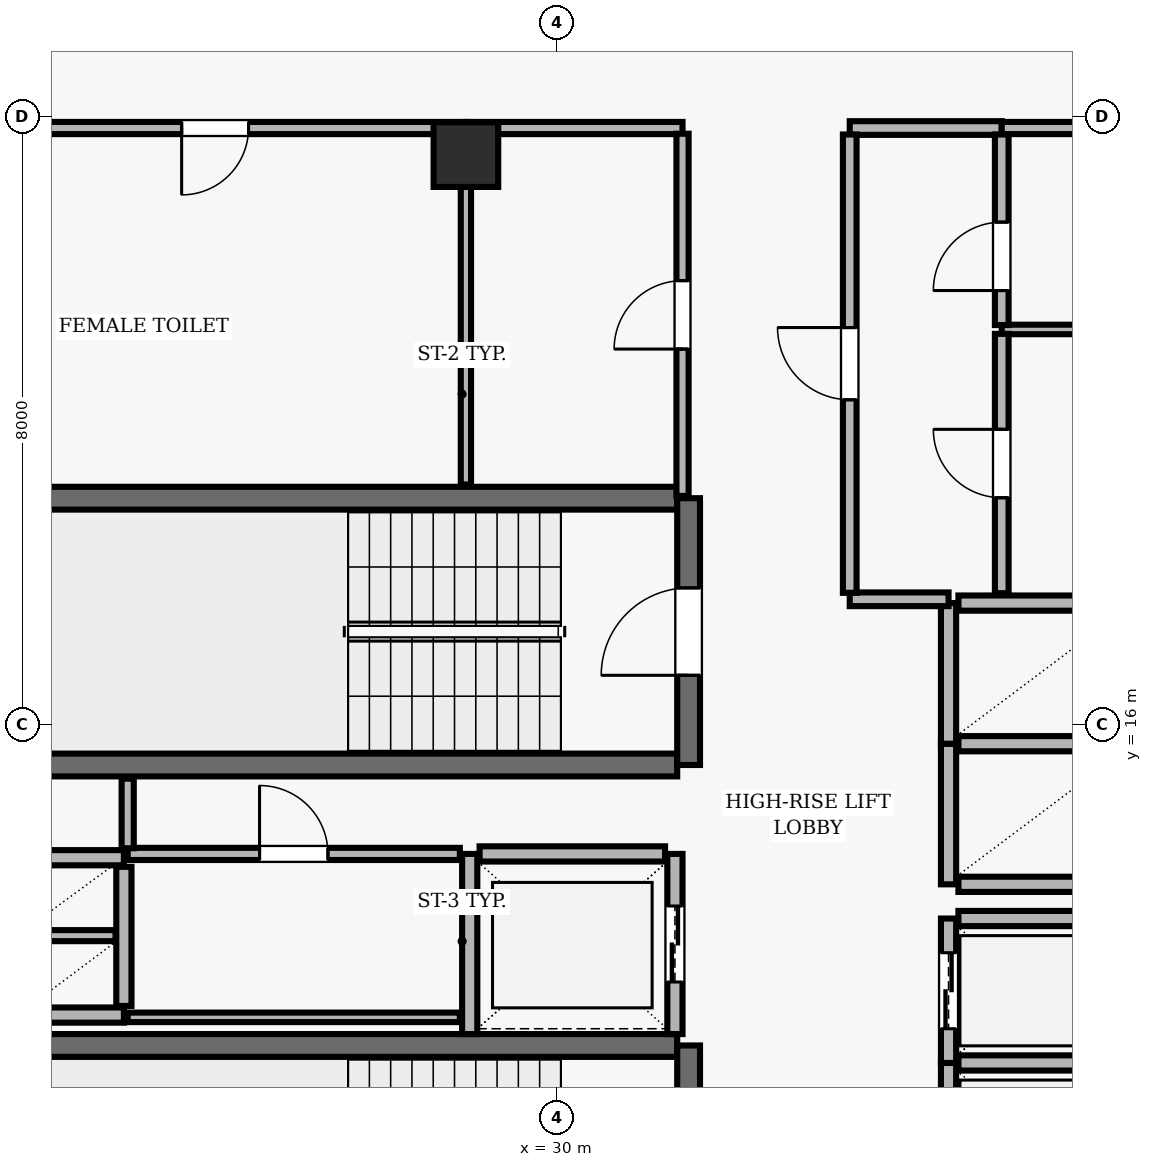
"""IFC4 building model, lengths in metres.
Left out: names, types, materials, properties, quantities, classifications, styles, units other than length and angle.
Written with IfcOpenShell. Run it as: python <this file> out.ifc"""

import sys

from ifc_helpers import new_model, si_unit, direction, frame, frame_2d, origin, origin_2d, place, context, subcontext, project, spatial, rectangle, extrude, element, fill, save


model = new_model("IFC4")
c1 = context("Model", 3, precision=1e-05, world=origin(), true_north=direction((0.0, 1.0)))
c2 = subcontext(c1, "Body", "Model", "MODEL_VIEW")
j1 = project(units=[si_unit("LENGTHUNIT", "METRE"), si_unit("PLANEANGLEUNIT", "RADIAN")], contexts=[c1])
p1 = place(None, origin())
s1 = spatial("IfcSite", under=j1, at=p1, CompositionType="ELEMENT")
p2 = place(p1, origin())
s2 = spatial("IfcBuilding", under=s1, at=p2, CompositionType="ELEMENT")
p3 = place(p2, frame((0.0, 0.0, 271.6)))
s3 = spatial("IfcBuildingStorey", under=s2, at=p3, CompositionType="ELEMENT", Elevation=271.6)
p4 = place(p3, frame((28.8, 23.5, 0.0), z_axis=(0.0, 0.0, 1.0), x_axis=(1.0, 0.0, 0.0)))
e1 = element("IfcColumn", 1, at=p4, inside=s3, PredefinedType="COLUMN", context=c2, shape_type="SweptSolid", body=[
    extrude(rectangle(XDim=0.85, YDim=0.85, at=origin_2d()), origin(), (0.0, 0.0, 1.0), 3.9),
])
for number, where, z_axis, x_axis in (
    (2, (31.58, 18.98, 0.0), (0.0, 0.0, 1.0), (-1.0, 0.0, 0.0)),
    (3, (23.22, 15.47, 0.0), (0.0, 0.0, 1.0), (1.0, 0.0, 0.0)),
):
    element("IfcWall", number, at=place(p3, frame(where, z_axis=z_axis, x_axis=x_axis)), inside=s3, PredefinedType="SHEAR", context=c2, shape_type="SweptSolid", body=[
        extrude(rectangle(XDim=8.36, YDim=0.3, at=frame_2d((4.18, 0.0))), origin(), (0.0, 0.0, 1.0), 3.69),
    ])
p5 = place(p3, frame((31.73, 15.47, 0.0), z_axis=(0.0, 0.0, 1.0), x_axis=(0.0, 1.0, 0.0)))
e4 = element("IfcWall", 4, at=p5, inside=s3, PredefinedType="SHEAR", context=c2, shape_type="SweptSolid", body=[
    extrude(rectangle(XDim=3.51, YDim=0.3, at=frame_2d((1.755, 0.0))), origin(), (0.0, 0.0, 1.0), 3.69),
])
p6 = place(p5, frame((1.18, 0.0, 0.0)))
e5 = element("IfcOpeningElement", 5, at=p6, cuts=e4, PredefinedType="OPENING", context=c2, shape_type="SweptSolid", body=[
    extrude(rectangle(XDim=1.15, YDim=2.15, at=frame_2d((0.575, 1.075))), frame((0.0, 0.16, 0.0), z_axis=(0.0, -1.0, 0.0), x_axis=(1.0, 0.0, 0.0)), (0.0, 0.0, 1.0), 0.32),
])
p7 = place(p3, frame((31.58, 11.78, 0.0), z_axis=(0.0, 0.0, 1.0), x_axis=(-1.0, 0.0, 0.0)))
e6 = element("IfcWall", 6, at=p7, inside=s3, PredefinedType="SHEAR", context=c2, shape_type="SweptSolid", body=[
    extrude(rectangle(XDim=8.36, YDim=0.3, at=frame_2d((4.18, 0.0))), origin(), (0.0, 0.0, 1.0), 3.69),
])
p8 = place(p3, frame((31.73, 8.27, 0.0), z_axis=(0.0, 0.0, 1.0), x_axis=(0.0, 1.0, 0.0)))
e7 = element("IfcWall", 7, at=p8, inside=s3, PredefinedType="SHEAR", context=c2, shape_type="SweptSolid", body=[
    extrude(rectangle(XDim=3.51, YDim=0.3, at=frame_2d((1.755, 0.0))), origin(), (0.0, 0.0, 1.0), 3.69),
])
p9 = place(p8, frame((1.18, 0.0, 0.0)))
e8 = element("IfcOpeningElement", 8, at=p9, cuts=e7, PredefinedType="OPENING", context=c2, shape_type="SweptSolid", body=[
    extrude(rectangle(XDim=1.15, YDim=2.15, at=frame_2d((0.575, 1.075))), frame((0.0, 0.16, 0.0), z_axis=(0.0, -1.0, 0.0), x_axis=(1.0, 0.0, 0.0)), (0.0, 0.0, 1.0), 0.32),
])
p10 = place(p3, frame((35.15, 11.55, 0.0), z_axis=(0.0, 0.0, 1.0), x_axis=(0.0, -1.0, 0.0)))
e9 = element("IfcWall", 9, at=p10, inside=s3, PredefinedType="SOLIDWALL", context=c2, shape_type="SweptSolid", body=[
    extrude(rectangle(XDim=1.9, YDim=0.2, at=frame_2d((0.95, 0.0))), origin(), (0.0, 0.0, 1.0), 3.69),
])
p11 = place(p10, frame((0.45, 0.0, 0.0)))
e10 = element("IfcOpeningElement", 10, at=p11, cuts=e9, PredefinedType="OPENING", context=c2, shape_type="SweptSolid", body=[
    extrude(rectangle(XDim=1.0, YDim=2.1, at=frame_2d((0.5, 1.05))), frame((0.0, 0.11, 0.0), z_axis=(0.0, -1.0, 0.0), x_axis=(1.0, 0.0, 0.0)), (0.0, 0.0, 1.0), 0.22),
])
p12 = place(p3, frame((37.42, 11.55, 0.0), z_axis=(0.0, 0.0, 1.0), x_axis=(-1.0, 0.0, 0.0)))
e11 = element("IfcWall", 11, at=p12, inside=s3, PredefinedType="SOLIDWALL", context=c2, shape_type="SweptSolid", body=[
    extrude(rectangle(XDim=2.14, YDim=0.2, at=frame_2d((1.07, 0.0))), origin(), (0.0, 0.0, 1.0), 3.69),
])
p13 = place(p3, frame((35.15, 13.45, 0.0), z_axis=(0.0, 0.0, 1.0), x_axis=(0.0, -1.0, 0.0)))
e12 = element("IfcWall", 12, at=p13, inside=s3, PredefinedType="SOLIDWALL", context=c2, shape_type="SweptSolid", body=[
    extrude(rectangle(XDim=1.9, YDim=0.2, at=frame_2d((0.95, 0.0))), origin(), (0.0, 0.0, 1.0), 3.69),
])
p14 = place(p13, frame((0.45, 0.0, 0.0)))
e13 = element("IfcOpeningElement", 13, at=p14, cuts=e12, PredefinedType="OPENING", context=c2, shape_type="SweptSolid", body=[
    extrude(rectangle(XDim=1.0, YDim=2.1, at=frame_2d((0.5, 1.05))), frame((0.0, 0.11, 0.0), z_axis=(0.0, -1.0, 0.0), x_axis=(1.0, 0.0, 0.0)), (0.0, 0.0, 1.0), 0.22),
])
p15 = place(p3, frame((37.42, 13.45, 0.0), z_axis=(0.0, 0.0, 1.0), x_axis=(-1.0, 0.0, 0.0)))
e14 = element("IfcWall", 14, at=p15, inside=s3, PredefinedType="SOLIDWALL", context=c2, shape_type="SweptSolid", body=[
    extrude(rectangle(XDim=2.14, YDim=0.2, at=frame_2d((1.07, 0.0))), origin(), (0.0, 0.0, 1.0), 3.69),
])
p16 = place(p3, frame((28.85, 14.3, 0.0), z_axis=(0.0, 0.0, 1.0), x_axis=(0.0, -1.0, 0.0)))
e15 = element("IfcWall", 15, at=p16, inside=s3, PredefinedType="SOLIDWALL", context=c2, shape_type="SweptSolid", body=[
    extrude(rectangle(XDim=2.37, YDim=0.2, at=frame_2d((1.185, 0.0))), origin(), (0.0, 0.0, 1.0), 3.69),
])
p17 = place(p3, frame((31.55, 11.93, 0.0), z_axis=(0.0, 0.0, 1.0), x_axis=(0.0, 1.0, 0.0)))
e16 = element("IfcWall", 16, at=p17, inside=s3, PredefinedType="SOLIDWALL", context=c2, shape_type="SweptSolid", body=[
    extrude(rectangle(XDim=2.37, YDim=0.2, at=frame_2d((1.185, 0.0))), origin(), (0.0, 0.0, 1.0), 3.69),
])
p18 = place(p17, frame((0.685, 0.0, 0.0)))
e17 = element("IfcOpeningElement", 17, at=p18, cuts=e16, PredefinedType="OPENING", context=c2, shape_type="SweptSolid", body=[
    extrude(rectangle(XDim=1.0, YDim=2.1, at=frame_2d((0.5, 1.05))), frame((0.0, 0.11, 0.0), z_axis=(0.0, -1.0, 0.0), x_axis=(1.0, 0.0, 0.0)), (0.0, 0.0, 1.0), 0.22),
])
p19 = place(p3, frame((31.42, 14.3, 0.0), z_axis=(0.0, 0.0, 1.0), x_axis=(-1.0, 0.0, 0.0)))
e18 = element("IfcWall", 18, at=p19, inside=s3, PredefinedType="SOLIDWALL", context=c2, shape_type="SweptSolid", body=[
    extrude(rectangle(XDim=2.44, YDim=0.2, at=frame_2d((1.22, 0.0))), origin(), (0.0, 0.0, 1.0), 3.69),
])
p20 = place(p3, frame((35.15, 15.75, 0.0), z_axis=(0.0, 0.0, 1.0), x_axis=(0.0, -1.0, 0.0)))
e19 = element("IfcWall", 19, at=p20, inside=s3, PredefinedType="SOLIDWALL", context=c2, shape_type="SweptSolid", body=[
    extrude(rectangle(XDim=1.85, YDim=0.2, at=frame_2d((0.925, 0.0))), origin(), (0.0, 0.0, 1.0), 3.69),
])
for number, where, z_axis, x_axis in (
    (20, (35.28, 13.9, 0.0), (0.0, 0.0, 1.0), (1.0, 0.0, 0.0)),
    (21, (37.42, 15.75, 0.0), (0.0, 0.0, 1.0), (-1.0, 0.0, 0.0)),
):
    element("IfcWall", number, at=place(p3, frame(where, z_axis=z_axis, x_axis=x_axis)), inside=s3, PredefinedType="SOLIDWALL", context=c2, shape_type="SweptSolid", body=[
        extrude(rectangle(XDim=2.14, YDim=0.2, at=frame_2d((1.07, 0.0))), origin(), (0.0, 0.0, 1.0), 3.69),
    ])
p21 = place(p3, frame((35.15, 17.6, 0.0), z_axis=(0.0, 0.0, 1.0), x_axis=(0.0, -1.0, 0.0)))
e22 = element("IfcWall", 22, at=p21, inside=s3, PredefinedType="SOLIDWALL", context=c2, shape_type="SweptSolid", body=[
    extrude(rectangle(XDim=1.85, YDim=0.2, at=frame_2d((0.925, 0.0))), origin(), (0.0, 0.0, 1.0), 3.69),
])
p22 = place(p3, frame((37.42, 17.6, 0.0), z_axis=(0.0, 0.0, 1.0), x_axis=(-1.0, 0.0, 0.0)))
e23 = element("IfcWall", 23, at=p22, inside=s3, PredefinedType="SOLIDWALL", context=c2, shape_type="SweptSolid", body=[
    extrude(rectangle(XDim=2.14, YDim=0.2, at=frame_2d((1.07, 0.0))), origin(), (0.0, 0.0, 1.0), 3.69),
])
for number, where, z_axis, x_axis in (
    (24, (22.9, 14.25, 0.0), (0.0, 0.0, 1.0), (1.0, 0.0, 0.0)),
    (25, (22.9, 12.18, 0.0), (0.0, 0.0, 1.0), (1.0, 0.0, 0.0)),
):
    element("IfcWall", number, at=place(p3, frame(where, z_axis=z_axis, x_axis=x_axis)), inside=s3, PredefinedType="SOLIDWALL", context=c2, shape_type="SweptSolid", body=[
        extrude(rectangle(XDim=1.4, YDim=0.2, at=frame_2d((0.7, 0.0))), origin(), (0.0, 0.0, 1.0), 3.69),
    ])
p23 = place(p3, frame((24.3, 12.3, 0.0), z_axis=(0.0, 0.0, 1.0), x_axis=(0.0, 1.0, 0.0)))
e26 = element("IfcWall", 26, at=p23, inside=s3, PredefinedType="SOLIDWALL", context=c2, shape_type="SweptSolid", body=[
    extrude(rectangle(XDim=1.83, YDim=0.2, at=frame_2d((0.915, 0.0))), origin(), (0.0, 0.0, 1.0), 3.69),
])
p24 = place(p3, frame((23.01, 13.225, 0.0), z_axis=(0.0, 0.0, 1.0), x_axis=(1.0, 0.0, 0.0)))
e27 = element("IfcWall", 27, at=p24, inside=s3, PredefinedType="PARTITIONING", context=c2, shape_type="SweptSolid", body=[
    extrude(rectangle(XDim=1.18, YDim=0.145, at=frame_2d((0.59, 0.0))), origin(), (0.0, 0.0, 1.0), 3.69),
])
p25 = place(p3, frame((24.35, 12.15, 0.0), z_axis=(0.0, 0.0, 1.0), x_axis=(1.0, 0.0, 0.0)))
e28 = element("IfcWall", 28, at=p25, inside=s3, PredefinedType="PARTITIONING", context=c2, shape_type="SweptSolid", body=[
    extrude(rectangle(XDim=4.37, YDim=0.125, at=frame_2d((2.185, 0.0))), origin(), (0.0, 0.0, 1.0), 3.69),
])
p26 = place(p3, frame((24.35, 14.3, 0.0), z_axis=(0.0, 0.0, 1.0), x_axis=(1.0, 0.0, 0.0)))
e29 = element("IfcWall", 29, at=p26, inside=s3, PredefinedType="PARTITIONING", context=c2, shape_type="SweptSolid", body=[
    extrude(rectangle(XDim=4.37, YDim=0.16, at=frame_2d((2.185, 0.0))), origin(), (0.0, 0.0, 1.0), 3.69),
])
p27 = place(p26, frame((1.735, 0.0, 0.0)))
e30 = element("IfcOpeningElement", 30, at=p27, cuts=e29, PredefinedType="OPENING", context=c2, shape_type="SweptSolid", body=[
    extrude(rectangle(XDim=0.9, YDim=2.1, at=frame_2d((0.45, 1.05))), frame((0.0, 0.09, 0.0), z_axis=(0.0, -1.0, 0.0), x_axis=(1.0, 0.0, 0.0)), (0.0, 0.0, 1.0), 0.18),
])
p28 = place(p3, frame((28.8, 23.85, 0.0), z_axis=(0.0, 0.0, 1.0), x_axis=(-1.0, 0.0, 0.0)))
e31 = element("IfcWall", 31, at=p28, inside=s3, PredefinedType="PARTITIONING", context=c2, shape_type="SweptSolid", body=[
    extrude(rectangle(XDim=6.6, YDim=0.16, at=frame_2d((3.3, 0.0))), origin(), (0.0, 0.0, 1.0), 3.221),
])
p29 = place(p28, frame((2.86, 0.0, 0.0)))
e32 = element("IfcOpeningElement", 32, at=p29, cuts=e31, PredefinedType="OPENING", context=c2, shape_type="SweptSolid", body=[
    extrude(rectangle(XDim=0.88, YDim=2.1, at=frame_2d((0.44, 1.05))), frame((0.0, 0.09, 0.0), z_axis=(0.0, -1.0, 0.0), x_axis=(1.0, 0.0, 0.0)), (0.0, 0.0, 1.0), 0.18),
])
p30 = place(p3, frame((31.65, 23.85, 0.0), z_axis=(0.0, 0.0, 1.0), x_axis=(-1.0, 0.0, 0.0)))
e33 = element("IfcWall", 33, at=p30, inside=s3, PredefinedType="PARTITIONING", context=c2, shape_type="SweptSolid", body=[
    extrude(rectangle(XDim=2.85, YDim=0.16, at=frame_2d((1.425, 0.0))), origin(), (0.0, 0.0, 1.0), 3.221),
])
p31 = place(p3, frame((33.85, 17.65, 0.0), z_axis=(0.0, 0.0, 1.0), x_axis=(1.0, 0.0, 0.0)))
e34 = element("IfcWall", 34, at=p31, inside=s3, PredefinedType="PARTITIONING", context=c2, shape_type="SweptSolid", body=[
    extrude(rectangle(XDim=1.3, YDim=0.18, at=frame_2d((0.65, 0.0))), origin(), (0.0, 0.0, 1.0), 3.69),
])
p32 = place(p3, frame((35.85, 21.2, 0.0), z_axis=(0.0, 0.0, 1.0), x_axis=(1.0, 0.0, 0.0)))
e35 = element("IfcWall", 35, at=p32, inside=s3, PredefinedType="PARTITIONING", context=c2, shape_type="SweptSolid", body=[
    extrude(rectangle(XDim=2.0, YDim=0.125, at=frame_2d((1.0, 0.0))), origin(), (0.0, 0.0, 1.0), 3.69),
])
p33 = place(p3, frame((35.85, 23.85, 0.0), z_axis=(0.0, 0.0, 1.0), x_axis=(-1.0, 0.0, 0.0)))
e36 = element("IfcWall", 36, at=p33, inside=s3, PredefinedType="PARTITIONING", context=c2, shape_type="SweptSolid", body=[
    extrude(rectangle(XDim=2.0, YDim=0.18, at=frame_2d((1.0, 0.0))), origin(), (0.0, 0.0, 1.0), 3.221),
])
p34 = place(p3, frame((37.85, 23.85, 0.0), z_axis=(0.0, 0.0, 1.0), x_axis=(-1.0, 0.0, 0.0)))
e37 = element("IfcWall", 37, at=p34, inside=s3, PredefinedType="PARTITIONING", context=c2, shape_type="SweptSolid", body=[
    extrude(rectangle(XDim=2.0, YDim=0.16, at=frame_2d((1.0, 0.0))), origin(), (0.0, 0.0, 1.0), 3.221),
])
p35 = place(p3, frame((24.35, 15.29, 0.0), z_axis=(0.0, 0.0, 1.0), x_axis=(0.0, -1.0, 0.0)))
e38 = element("IfcWall", 38, at=p35, inside=s3, PredefinedType="PARTITIONING", context=c2, shape_type="SweptSolid", body=[
    extrude(rectangle(XDim=0.915, YDim=0.16, at=frame_2d((0.458, 0.0))), origin(), (0.0, 0.0, 1.0), 3.69),
])
p36 = place(p3, frame((28.8, 23.775, 0.0), z_axis=(0.0, 0.0, 1.0), x_axis=(0.0, -1.0, 0.0)))
e39 = element("IfcWall", 39, at=p36, inside=s3, PredefinedType="PARTITIONING", context=c2, shape_type="SweptSolid", body=[
    extrude(rectangle(XDim=4.615, YDim=0.135, at=frame_2d((2.308, 0.0))), origin(), (0.0, 0.0, 1.0), 3.69),
])
p37 = place(p3, frame((31.65, 19.01, 0.0), z_axis=(0.0, 0.0, 1.0), x_axis=(0.0, 1.0, 0.0)))
e40 = element("IfcWall", 40, at=p37, inside=s3, PredefinedType="PARTITIONING", context=c2, shape_type="SweptSolid", body=[
    extrude(rectangle(XDim=4.765, YDim=0.16, at=frame_2d((2.382, 0.0))), origin(), (0.0, 0.0, 1.0), 3.69),
])
p38 = place(p37, frame((1.932, 0.0, 0.0)))
e41 = element("IfcOpeningElement", 41, at=p38, cuts=e40, PredefinedType="OPENING", context=c2, shape_type="SweptSolid", body=[
    extrude(rectangle(XDim=0.9, YDim=2.1, at=frame_2d((0.45, 1.05))), frame((0.0, 0.09, 0.0), z_axis=(0.0, -1.0, 0.0), x_axis=(1.0, 0.0, 0.0)), (0.0, 0.0, 1.0), 0.18),
])
p39 = place(p3, frame((33.85, 17.735, 0.0), z_axis=(0.0, 0.0, 1.0), x_axis=(0.0, 1.0, 0.0)))
e42 = element("IfcWall", 42, at=p39, inside=s3, PredefinedType="PARTITIONING", context=c2, shape_type="SweptSolid", body=[
    extrude(rectangle(XDim=6.03, YDim=0.18, at=frame_2d((3.015, 0.0))), origin(), (0.0, 0.0, 1.0), 3.69),
])
p40 = place(p39, frame((2.54, 0.0, 0.0)))
e43 = element("IfcOpeningElement", 43, at=p40, cuts=e42, PredefinedType="OPENING", context=c2, shape_type="SweptSolid", body=[
    extrude(rectangle(XDim=0.95, YDim=2.1, at=frame_2d((0.475, 1.05))), frame((0.0, 0.1, 0.0), z_axis=(0.0, -1.0, 0.0), x_axis=(1.0, 0.0, 0.0)), (0.0, 0.0, 1.0), 0.2),
])
p41 = place(p3, frame((35.85, 17.73, 0.0), z_axis=(0.0, 0.0, 1.0), x_axis=(0.0, 1.0, 0.0)))
e44 = element("IfcWall", 44, at=p41, inside=s3, PredefinedType="PARTITIONING", context=c2, shape_type="SweptSolid", body=[
    extrude(rectangle(XDim=3.412, YDim=0.18, at=frame_2d((1.706, 0.0))), origin(), (0.0, 0.0, 1.0), 3.69),
])
p42 = place(p41, frame((1.256, 0.0, 0.0)))
e45 = element("IfcOpeningElement", 45, at=p42, cuts=e44, PredefinedType="OPENING", context=c2, shape_type="SweptSolid", body=[
    extrude(rectangle(XDim=0.9, YDim=2.1, at=frame_2d((0.45, 1.05))), frame((0.0, 0.1, 0.0), z_axis=(0.0, -1.0, 0.0), x_axis=(1.0, 0.0, 0.0)), (0.0, 0.0, 1.0), 0.2),
])
p43 = place(p3, frame((35.85, 21.258, 0.0), z_axis=(0.0, 0.0, 1.0), x_axis=(0.0, 1.0, 0.0)))
e46 = element("IfcWall", 46, at=p43, inside=s3, PredefinedType="PARTITIONING", context=c2, shape_type="SweptSolid", body=[
    extrude(rectangle(XDim=2.507, YDim=0.18, at=frame_2d((1.253, 0.0))), origin(), (0.0, 0.0, 1.0), 3.69),
])
p44 = place(p43, frame((0.454, 0.0, 0.0)))
e47 = element("IfcOpeningElement", 47, at=p44, cuts=e46, PredefinedType="OPENING", context=c2, shape_type="SweptSolid", body=[
    extrude(rectangle(XDim=0.9, YDim=2.1, at=frame_2d((0.45, 1.05))), frame((0.0, 0.1, 0.0), z_axis=(0.0, -1.0, 0.0), x_axis=(1.0, 0.0, 0.0)), (0.0, 0.0, 1.0), 0.2),
])
p45 = place(p6, origin())
e48 = element("IfcDoor", 48, at=p45, inside=s3, OperationType="SINGLE_SWING_LEFT", PredefinedType="DOOR", context=c2, shape_type="SweptSolid", body=[
    extrude(rectangle(XDim=1.15, YDim=2.15, at=frame_2d((0.575, 1.075))), frame((0.0, 0.025, 0.0), z_axis=(0.0, -1.0, 0.0), x_axis=(1.0, 0.0, 0.0)), (0.0, 0.0, 1.0), 0.05),
])
fill(e5, e48)
p46 = place(p14, origin())
e49 = element("IfcDoor", 49, at=p46, inside=s3, OperationType="DOUBLE_DOOR_SLIDING", PredefinedType="DOOR", context=c2, shape_type="SweptSolid", body=[
    extrude(rectangle(XDim=1.0, YDim=2.1, at=frame_2d((0.5, 1.05))), frame((0.0, 0.025, 0.0), z_axis=(0.0, -1.0, 0.0), x_axis=(1.0, 0.0, 0.0)), (0.0, 0.0, 1.0), 0.05),
])
fill(e13, e49)
p47 = place(p18, origin())
e50 = element("IfcDoor", 50, at=p47, inside=s3, OperationType="DOUBLE_DOOR_SLIDING", PredefinedType="DOOR", context=c2, shape_type="SweptSolid", body=[
    extrude(rectangle(XDim=1.0, YDim=2.1, at=frame_2d((0.5, 1.05))), frame((0.0, 0.025, 0.0), z_axis=(0.0, -1.0, 0.0), x_axis=(1.0, 0.0, 0.0)), (0.0, 0.0, 1.0), 0.05),
])
fill(e17, e50)
p48 = place(p40, origin())
e51 = element("IfcDoor", 51, at=p48, inside=s3, OperationType="SINGLE_SWING_RIGHT", PredefinedType="DOOR", context=c2, shape_type="SweptSolid", body=[
    extrude(rectangle(XDim=0.95, YDim=2.1, at=frame_2d((0.475, 1.05))), frame((0.0, 0.025, 0.0), z_axis=(0.0, -1.0, 0.0), x_axis=(1.0, 0.0, 0.0)), (0.0, 0.0, 1.0), 0.05),
])
fill(e43, e51)
p49 = place(p44, origin())
e52 = element("IfcDoor", 52, at=p49, inside=s3, OperationType="SINGLE_SWING_LEFT", PredefinedType="DOOR", context=c2, shape_type="SweptSolid", body=[
    extrude(rectangle(XDim=0.9, YDim=2.1, at=frame_2d((0.45, 1.05))), frame((0.0, 0.025, 0.0), z_axis=(0.0, -1.0, 0.0), x_axis=(1.0, 0.0, 0.0)), (0.0, 0.0, 1.0), 0.05),
])
fill(e47, e52)
p50 = place(p42, origin())
e53 = element("IfcDoor", 53, at=p50, inside=s3, OperationType="SINGLE_SWING_RIGHT", PredefinedType="DOOR", context=c2, shape_type="SweptSolid", body=[
    extrude(rectangle(XDim=0.9, YDim=2.1, at=frame_2d((0.45, 1.05))), frame((0.0, 0.025, 0.0), z_axis=(0.0, -1.0, 0.0), x_axis=(1.0, 0.0, 0.0)), (0.0, 0.0, 1.0), 0.05),
])
fill(e45, e53)
p51 = place(p38, origin())
e54 = element("IfcDoor", 54, at=p51, inside=s3, OperationType="SINGLE_SWING_LEFT", PredefinedType="DOOR", context=c2, shape_type="SweptSolid", body=[
    extrude(rectangle(XDim=0.9, YDim=2.1, at=frame_2d((0.45, 1.05))), frame((0.0, 0.025, 0.0), z_axis=(0.0, -1.0, 0.0), x_axis=(1.0, 0.0, 0.0)), (0.0, 0.0, 1.0), 0.05),
])
fill(e41, e54)
p52 = place(p27, origin())
e55 = element("IfcDoor", 55, at=p52, inside=s3, OperationType="SINGLE_SWING_LEFT", PredefinedType="DOOR", context=c2, shape_type="SweptSolid", body=[
    extrude(rectangle(XDim=0.9, YDim=2.1, at=frame_2d((0.45, 1.05))), frame((0.0, 0.025, 0.0), z_axis=(0.0, -1.0, 0.0), x_axis=(1.0, 0.0, 0.0)), (0.0, 0.0, 1.0), 0.05),
])
fill(e30, e55)
p53 = place(p29, origin())
e56 = element("IfcDoor", 56, at=p53, inside=s3, OperationType="SINGLE_SWING_RIGHT", PredefinedType="DOOR", context=c2, shape_type="SweptSolid", body=[
    extrude(rectangle(XDim=0.88, YDim=2.1, at=frame_2d((0.44, 1.05))), frame((0.0, 0.025, 0.0), z_axis=(0.0, -1.0, 0.0), x_axis=(1.0, 0.0, 0.0)), (0.0, 0.0, 1.0), 0.05),
])
fill(e32, e56)
save(model, sys.argv[1])
